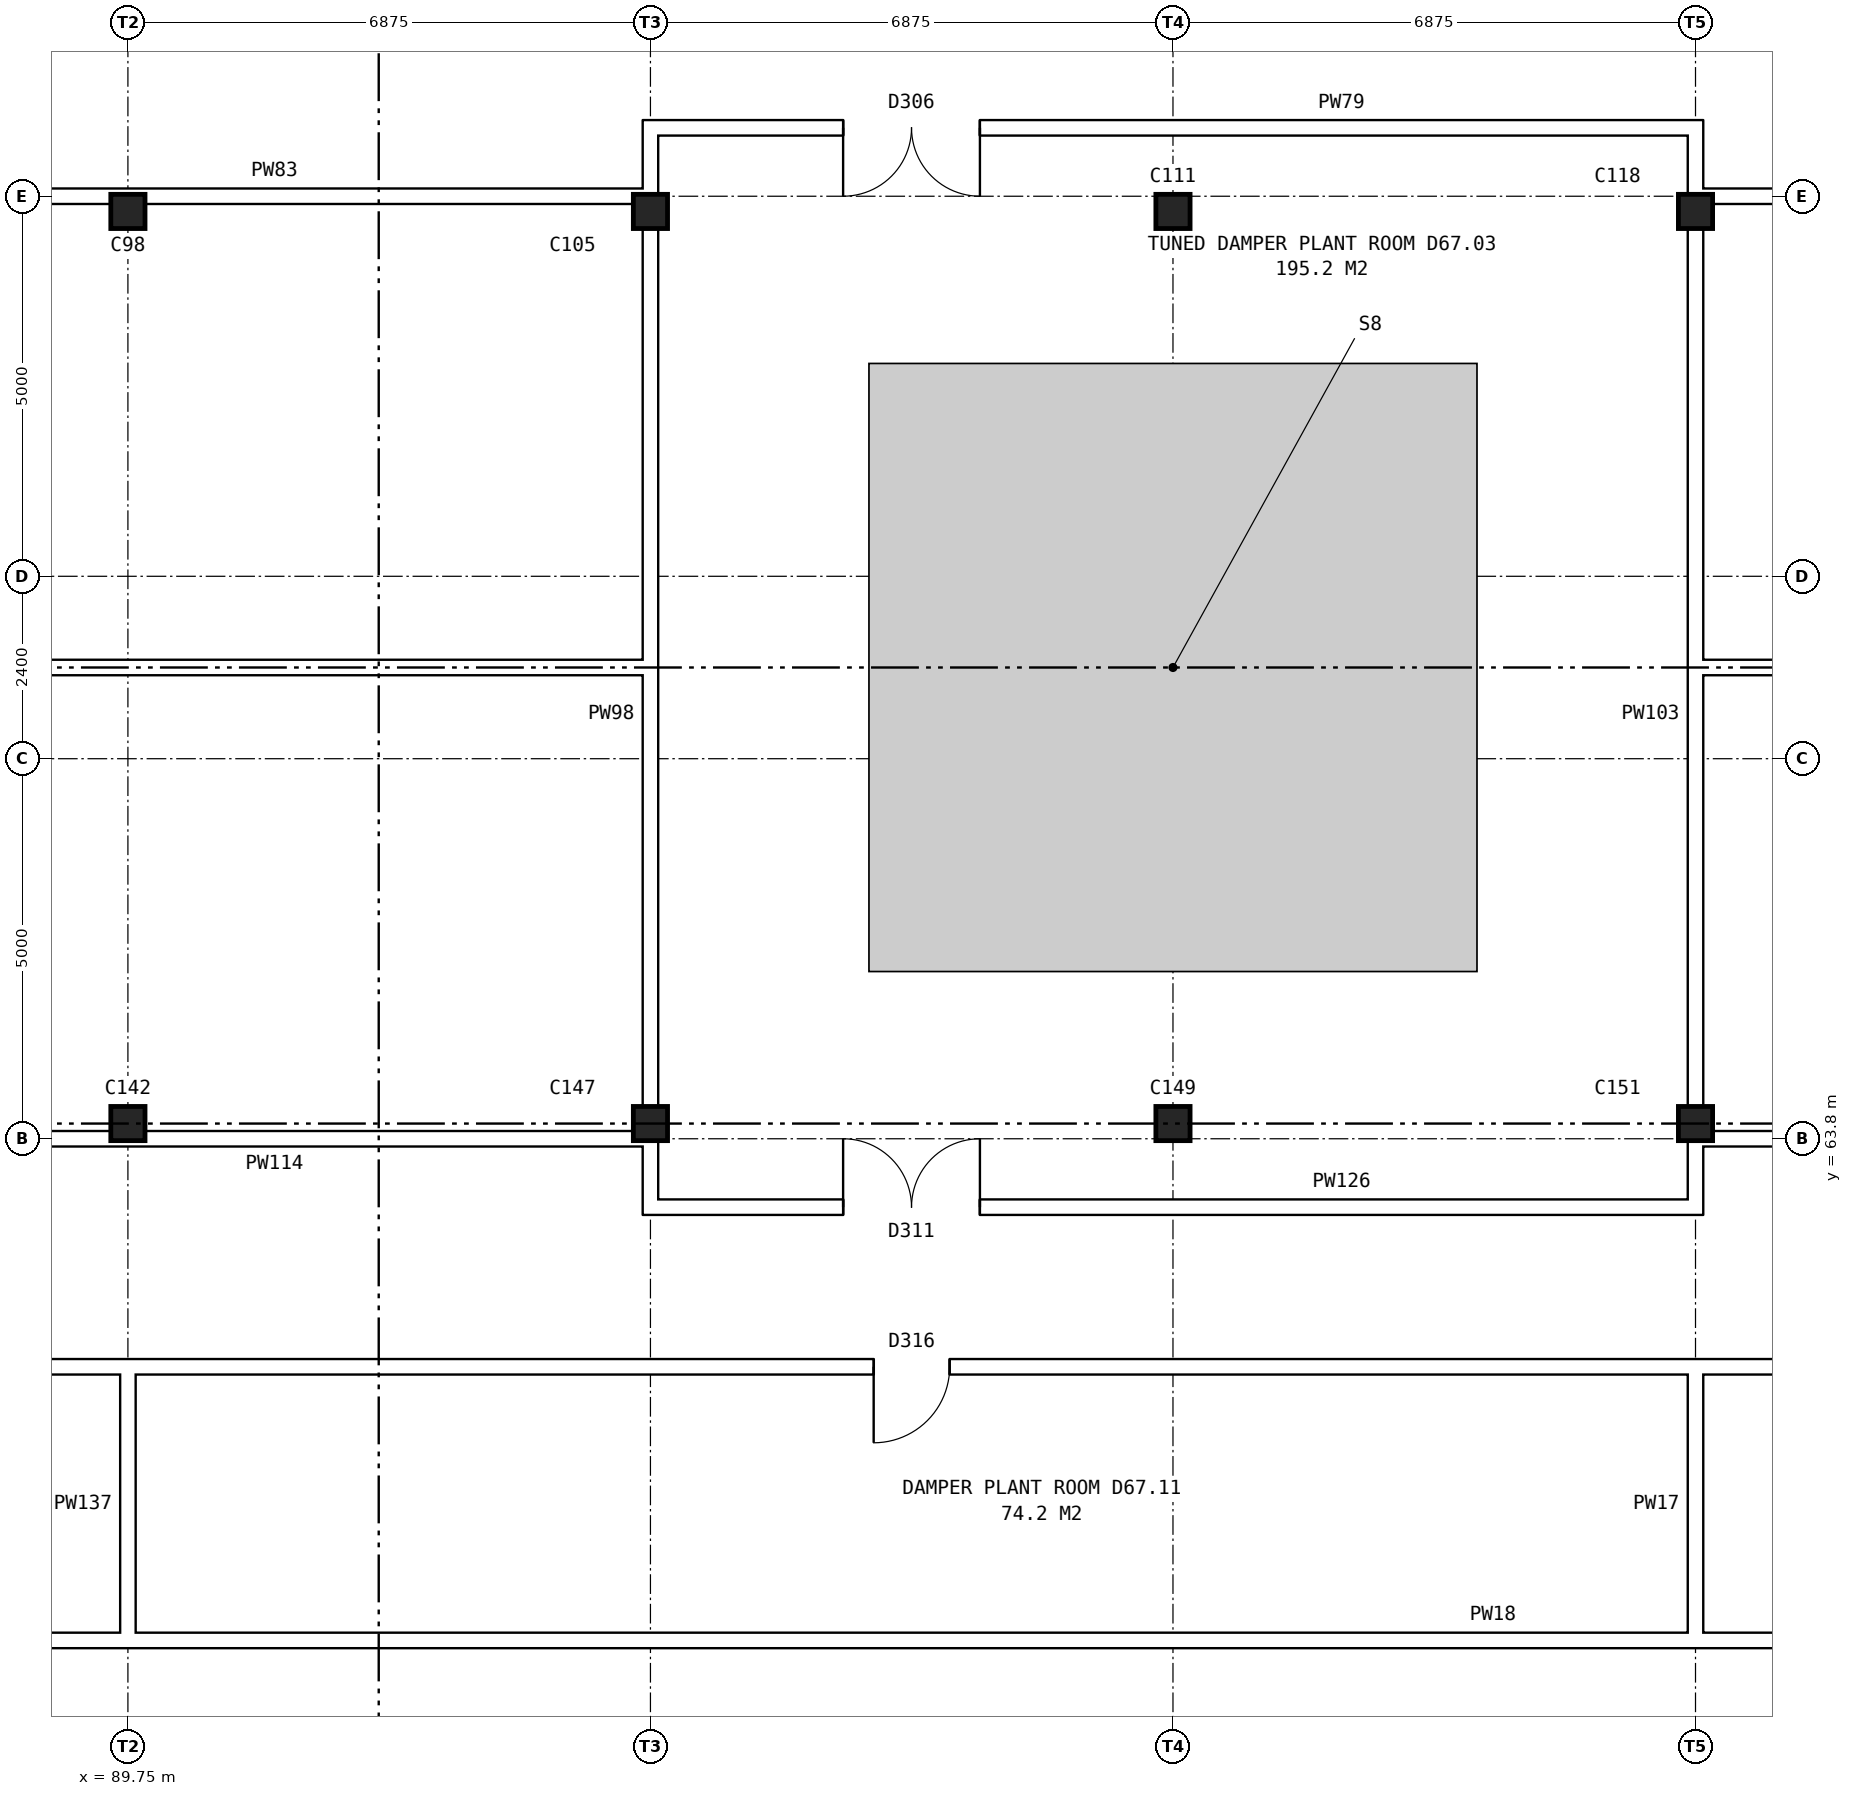
"""IFC4 building model, lengths in metres.
Left out: names, types, materials, properties, quantities, classifications, styles, units other than length and angle.
Written with IfcOpenShell. Run it as: python <this file> out.ifc"""

import sys

from ifc_helpers import new_model, si_unit, direction, frame, frame_2d, origin, origin_2d, place, context, subcontext, project, spatial, rectangle, hollow_rectangle, extrude, element, fill, save


model = new_model("IFC4")
c1 = context("Model", 3, precision=1e-05, world=origin(), true_north=direction((0.0, 1.0)))
c2 = subcontext(c1, "Body", "Model", "MODEL_VIEW")
j1 = project(units=[si_unit("LENGTHUNIT", "METRE"), si_unit("PLANEANGLEUNIT", "RADIAN")], contexts=[c1])
p1 = place(None, origin())
s1 = spatial("IfcSite", under=j1, at=p1, CompositionType="ELEMENT")
p2 = place(p1, origin())
s2 = spatial("IfcBuilding", under=s1, at=p2, CompositionType="ELEMENT")
p3 = place(p2, frame((0.0, 0.0, 236.9)))
s3 = spatial("IfcBuildingStorey", under=s2, at=p3, CompositionType="ELEMENT", Elevation=236.9)
for number, where, z_axis, x_axis in (
    (1, (89.75, 64.0, 0.0), (0.0, 0.0, 1.0), (1.0, 0.0, 0.0)),
    (2, (96.625, 64.0, 0.0), (0.0, 0.0, 1.0), (1.0, 0.0, 0.0)),
    (3, (103.5, 64.0, 0.0), (0.0, 0.0, 1.0), (1.0, 0.0, 0.0)),
    (4, (110.375, 64.0, 0.0), (0.0, 0.0, 1.0), (1.0, 0.0, 0.0)),
    (5, (89.75, 76.0, 0.0), (0.0, 0.0, 1.0), (1.0, 0.0, 0.0)),
    (6, (96.625, 76.0, 0.0), (0.0, 0.0, 1.0), (1.0, 0.0, 0.0)),
    (7, (103.5, 76.0, 0.0), (0.0, 0.0, 1.0), (1.0, 0.0, 0.0)),
    (8, (110.375, 76.0, 0.0), (0.0, 0.0, 1.0), (1.0, 0.0, 0.0)),
):
    element("IfcColumn", number, at=place(p3, frame(where, z_axis=z_axis, x_axis=x_axis)), inside=s3, PredefinedType="COLUMN", context=c2, shape_type="SweptSolid", body=[
        extrude(hollow_rectangle(XDim=0.45, YDim=0.45, WallThickness=0.025, at=origin_2d()), origin(), (0.0, 0.0, 1.0), 6.7),
    ])
p4 = place(p3, frame((46.66, 57.2, 0.0), z_axis=(0.0, 0.0, 1.0), x_axis=(1.0, 0.0, 0.0)))
e9 = element("IfcWall", 9, at=p4, inside=s3, PredefinedType="PARTITIONING", context=c2, shape_type="SweptSolid", body=[
    extrude(rectangle(XDim=122.1, YDim=0.2, at=frame_2d((61.05, 0.0))), origin(), (0.0, 0.0, 1.0), 6.7),
])
p5 = place(p3, frame((46.66, 60.8, 0.0), z_axis=(0.0, 0.0, 1.0), x_axis=(1.0, 0.0, 0.0)))
e10 = element("IfcWall", 10, at=p5, inside=s3, PredefinedType="PARTITIONING", context=c2, shape_type="SweptSolid", body=[
    extrude(rectangle(XDim=122.1, YDim=0.2, at=frame_2d((61.05, 0.0))), origin(), (0.0, 0.0, 1.0), 6.7),
])
p6 = place(p5, frame((6.12, 0.0, 0.0)))
e11 = element("IfcOpeningElement", 11, at=p6, cuts=e10, PredefinedType="OPENING", context=c2, shape_type="SweptSolid", body=[
    extrude(rectangle(XDim=1.0, YDim=2.1, at=frame_2d((0.5, 1.05))), frame((0.0, 0.11, 0.0), z_axis=(0.0, -1.0, 0.0), x_axis=(1.0, 0.0, 0.0)), (0.0, 0.0, 1.0), 0.22),
])
p7 = place(p5, frame((15.64, 0.0, 0.0)))
e12 = element("IfcOpeningElement", 12, at=p7, cuts=e10, PredefinedType="OPENING", context=c2, shape_type="SweptSolid", body=[
    extrude(rectangle(XDim=1.0, YDim=2.1, at=frame_2d((0.5, 1.05))), frame((0.0, 0.11, 0.0), z_axis=(0.0, -1.0, 0.0), x_axis=(1.0, 0.0, 0.0)), (0.0, 0.0, 1.0), 0.22),
])
p8 = place(p5, frame((25.66, 0.0, 0.0)))
e13 = element("IfcOpeningElement", 13, at=p8, cuts=e10, PredefinedType="OPENING", context=c2, shape_type="SweptSolid", body=[
    extrude(rectangle(XDim=1.0, YDim=2.1, at=frame_2d((0.5, 1.05))), frame((0.0, 0.11, 0.0), z_axis=(0.0, -1.0, 0.0), x_axis=(1.0, 0.0, 0.0)), (0.0, 0.0, 1.0), 0.22),
])
p9 = place(p5, frame((35.535, 0.0, 0.0)))
e14 = element("IfcOpeningElement", 14, at=p9, cuts=e10, PredefinedType="OPENING", context=c2, shape_type="SweptSolid", body=[
    extrude(rectangle(XDim=1.0, YDim=2.1, at=frame_2d((0.5, 1.05))), frame((0.0, 0.11, 0.0), z_axis=(0.0, -1.0, 0.0), x_axis=(1.0, 0.0, 0.0)), (0.0, 0.0, 1.0), 0.22),
])
p10 = place(p5, frame((52.902, 0.0, 0.0)))
e15 = element("IfcOpeningElement", 15, at=p10, cuts=e10, PredefinedType="OPENING", context=c2, shape_type="SweptSolid", body=[
    extrude(rectangle(XDim=1.0, YDim=2.1, at=frame_2d((0.5, 1.05))), frame((0.0, 0.11, 0.0), z_axis=(0.0, -1.0, 0.0), x_axis=(1.0, 0.0, 0.0)), (0.0, 0.0, 1.0), 0.22),
])
p11 = place(p5, frame((73.708, 0.0, 0.0)))
e16 = element("IfcOpeningElement", 16, at=p11, cuts=e10, PredefinedType="OPENING", context=c2, shape_type="SweptSolid", body=[
    extrude(rectangle(XDim=1.0, YDim=2.1, at=frame_2d((0.5, 1.05))), frame((0.0, 0.11, 0.0), z_axis=(0.0, -1.0, 0.0), x_axis=(1.0, 0.0, 0.0)), (0.0, 0.0, 1.0), 0.22),
])
p12 = place(p5, frame((90.02, 0.0, 0.0)))
e17 = element("IfcOpeningElement", 17, at=p12, cuts=e10, PredefinedType="OPENING", context=c2, shape_type="SweptSolid", body=[
    extrude(rectangle(XDim=1.0, YDim=2.1, at=frame_2d((0.5, 1.05))), frame((0.0, 0.11, 0.0), z_axis=(0.0, -1.0, 0.0), x_axis=(1.0, 0.0, 0.0)), (0.0, 0.0, 1.0), 0.22),
])
p13 = place(p5, frame((101.84, 0.0, 0.0)))
e18 = element("IfcOpeningElement", 18, at=p13, cuts=e10, PredefinedType="OPENING", context=c2, shape_type="SweptSolid", body=[
    extrude(rectangle(XDim=1.0, YDim=2.1, at=frame_2d((0.5, 1.05))), frame((0.0, 0.11, 0.0), z_axis=(0.0, -1.0, 0.0), x_axis=(1.0, 0.0, 0.0)), (0.0, 0.0, 1.0), 0.22),
])
p14 = place(p5, frame((114.66, 0.0, 0.0)))
e19 = element("IfcOpeningElement", 19, at=p14, cuts=e10, PredefinedType="OPENING", context=c2, shape_type="SweptSolid", body=[
    extrude(rectangle(XDim=1.0, YDim=2.1, at=frame_2d((0.5, 1.05))), frame((0.0, 0.11, 0.0), z_axis=(0.0, -1.0, 0.0), x_axis=(1.0, 0.0, 0.0)), (0.0, 0.0, 1.0), 0.22),
])
p15 = place(p3, frame((96.525, 62.9, 0.0), z_axis=(0.0, 0.0, 1.0), x_axis=(1.0, 0.0, 0.0)))
e20 = element("IfcWall", 20, at=p15, inside=s3, PredefinedType="PARTITIONING", context=c2, shape_type="SweptSolid", body=[
    extrude(rectangle(XDim=13.95, YDim=0.2, at=frame_2d((6.975, 0.0))), origin(), (0.0, 0.0, 1.0), 6.7),
])
p16 = place(p15, frame((2.635, 0.0, 0.0)))
e21 = element("IfcOpeningElement", 21, at=p16, cuts=e20, PredefinedType="OPENING", context=c2, shape_type="SweptSolid", body=[
    extrude(rectangle(XDim=1.8, YDim=2.1, at=frame_2d((0.9, 1.05))), frame((0.0, 0.11, 0.0), z_axis=(0.0, -1.0, 0.0), x_axis=(1.0, 0.0, 0.0)), (0.0, 0.0, 1.0), 0.22),
])
p17 = place(p3, frame((75.64, 63.8, 0.0), z_axis=(0.0, 0.0, 1.0), x_axis=(1.0, 0.0, 0.0)))
e22 = element("IfcWall", 22, at=p17, inside=s3, PredefinedType="PARTITIONING", context=c2, shape_type="SweptSolid", body=[
    extrude(rectangle(XDim=21.085, YDim=0.2, at=frame_2d((10.542, 0.0))), origin(), (0.0, 0.0, 1.0), 6.7),
])
p18 = place(p17, frame((9.992, 0.0, 0.0)))
e23 = element("IfcOpeningElement", 23, at=p18, cuts=e22, PredefinedType="OPENING", context=c2, shape_type="SweptSolid", body=[
    extrude(rectangle(XDim=1.0, YDim=2.1, at=frame_2d((0.5, 1.05))), frame((0.0, 0.11, 0.0), z_axis=(0.0, -1.0, 0.0), x_axis=(1.0, 0.0, 0.0)), (0.0, 0.0, 1.0), 0.22),
])
p19 = place(p3, frame((110.275, 63.8, 0.0), z_axis=(0.0, 0.0, 1.0), x_axis=(1.0, 0.0, 0.0)))
e24 = element("IfcWall", 24, at=p19, inside=s3, PredefinedType="PARTITIONING", context=c2, shape_type="SweptSolid", body=[
    extrude(rectangle(XDim=21.085, YDim=0.2, at=frame_2d((10.542, 0.0))), origin(), (0.0, 0.0, 1.0), 6.7),
])
p20 = place(p19, frame((10.093, 0.0, 0.0)))
e25 = element("IfcOpeningElement", 25, at=p20, cuts=e24, PredefinedType="OPENING", context=c2, shape_type="SweptSolid", body=[
    extrude(rectangle(XDim=1.0, YDim=2.1, at=frame_2d((0.5, 1.05))), frame((0.0, 0.11, 0.0), z_axis=(0.0, -1.0, 0.0), x_axis=(1.0, 0.0, 0.0)), (0.0, 0.0, 1.0), 0.22),
])
for number, where, z_axis, x_axis in (
    (26, (75.64, 70.0, 0.0), (0.0, 0.0, 1.0), (1.0, 0.0, 0.0)),
    (27, (110.275, 70.0, 0.0), (0.0, 0.0, 1.0), (1.0, 0.0, 0.0)),
):
    element("IfcWall", number, at=place(p3, frame(where, z_axis=z_axis, x_axis=x_axis)), inside=s3, PredefinedType="PARTITIONING", context=c2, shape_type="SweptSolid", body=[
        extrude(rectangle(XDim=21.085, YDim=0.2, at=frame_2d((10.542, 0.0))), origin(), (0.0, 0.0, 1.0), 6.7),
    ])
p21 = place(p3, frame((75.64, 76.2, 0.0), z_axis=(0.0, 0.0, 1.0), x_axis=(1.0, 0.0, 0.0)))
e28 = element("IfcWall", 28, at=p21, inside=s3, PredefinedType="PARTITIONING", context=c2, shape_type="SweptSolid", body=[
    extrude(rectangle(XDim=21.085, YDim=0.2, at=frame_2d((10.542, 0.0))), origin(), (0.0, 0.0, 1.0), 6.7),
])
p22 = place(p21, frame((9.992, 0.0, 0.0)))
e29 = element("IfcOpeningElement", 29, at=p22, cuts=e28, PredefinedType="OPENING", context=c2, shape_type="SweptSolid", body=[
    extrude(rectangle(XDim=1.0, YDim=2.1, at=frame_2d((0.5, 1.05))), frame((0.0, 0.11, 0.0), z_axis=(0.0, -1.0, 0.0), x_axis=(1.0, 0.0, 0.0)), (0.0, 0.0, 1.0), 0.22),
])
p23 = place(p3, frame((110.275, 76.2, 0.0), z_axis=(0.0, 0.0, 1.0), x_axis=(1.0, 0.0, 0.0)))
e30 = element("IfcWall", 30, at=p23, inside=s3, PredefinedType="PARTITIONING", context=c2, shape_type="SweptSolid", body=[
    extrude(rectangle(XDim=21.085, YDim=0.2, at=frame_2d((10.542, 0.0))), origin(), (0.0, 0.0, 1.0), 6.7),
])
p24 = place(p23, frame((10.093, 0.0, 0.0)))
e31 = element("IfcOpeningElement", 31, at=p24, cuts=e30, PredefinedType="OPENING", context=c2, shape_type="SweptSolid", body=[
    extrude(rectangle(XDim=1.0, YDim=2.1, at=frame_2d((0.5, 1.05))), frame((0.0, 0.11, 0.0), z_axis=(0.0, -1.0, 0.0), x_axis=(1.0, 0.0, 0.0)), (0.0, 0.0, 1.0), 0.22),
])
p25 = place(p3, frame((96.525, 77.1, 0.0), z_axis=(0.0, 0.0, 1.0), x_axis=(1.0, 0.0, 0.0)))
e32 = element("IfcWall", 32, at=p25, inside=s3, PredefinedType="PARTITIONING", context=c2, shape_type="SweptSolid", body=[
    extrude(rectangle(XDim=13.95, YDim=0.2, at=frame_2d((6.975, 0.0))), origin(), (0.0, 0.0, 1.0), 6.7),
])
p26 = place(p25, frame((2.635, 0.0, 0.0)))
e33 = element("IfcOpeningElement", 33, at=p26, cuts=e32, PredefinedType="OPENING", context=c2, shape_type="SweptSolid", body=[
    extrude(rectangle(XDim=1.8, YDim=2.1, at=frame_2d((0.9, 1.05))), frame((0.0, 0.11, 0.0), z_axis=(0.0, -1.0, 0.0), x_axis=(1.0, 0.0, 0.0)), (0.0, 0.0, 1.0), 0.22),
])
p27 = place(p3, frame((89.75, 57.1, 0.0), z_axis=(0.0, 0.0, 1.0), x_axis=(0.0, 1.0, 0.0)))
e34 = element("IfcWall", 34, at=p27, inside=s3, PredefinedType="PARTITIONING", context=c2, shape_type="SweptSolid", body=[
    extrude(rectangle(XDim=3.8, YDim=0.2, at=frame_2d((1.9, 0.0))), origin(), (0.0, 0.0, 1.0), 6.167),
])
p28 = place(p3, frame((96.625, 62.8, 0.0), z_axis=(0.0, 0.0, 1.0), x_axis=(0.0, 1.0, 0.0)))
e35 = element("IfcWall", 35, at=p28, inside=s3, PredefinedType="PARTITIONING", context=c2, shape_type="SweptSolid", body=[
    extrude(rectangle(XDim=14.4, YDim=0.2, at=frame_2d((7.2, 0.0))), origin(), (0.0, 0.0, 1.0), 6.088),
])
p29 = place(p3, frame((110.375, 57.1, 0.0), z_axis=(0.0, 0.0, 1.0), x_axis=(0.0, 1.0, 0.0)))
e36 = element("IfcWall", 36, at=p29, inside=s3, PredefinedType="PARTITIONING", context=c2, shape_type="SweptSolid", body=[
    extrude(rectangle(XDim=3.8, YDim=0.2, at=frame_2d((1.9, 0.0))), origin(), (0.0, 0.0, 1.0), 6.167),
])
p30 = place(p3, frame((110.375, 62.8, 0.0), z_axis=(0.0, 0.0, 1.0), x_axis=(0.0, 1.0, 0.0)))
e37 = element("IfcWall", 37, at=p30, inside=s3, PredefinedType="PARTITIONING", context=c2, shape_type="SweptSolid", body=[
    extrude(rectangle(XDim=14.4, YDim=0.2, at=frame_2d((7.2, 0.0))), origin(), (0.0, 0.0, 1.0), 6.088),
])
p31 = place(p10, frame((1.0, 0.0, 0.0), z_axis=(0.0, 0.0, 1.0), x_axis=(-1.0, 0.0, 0.0)))
e38 = element("IfcDoor", 38, at=p31, inside=s3, OperationType="SINGLE_SWING_RIGHT", PredefinedType="DOOR", context=c2, shape_type="SweptSolid", body=[
    extrude(rectangle(XDim=1.0, YDim=2.1, at=frame_2d((0.5, 1.05))), frame((0.0, 0.025, 0.0), z_axis=(0.0, -1.0, 0.0), x_axis=(1.0, 0.0, 0.0)), (0.0, 0.0, 1.0), 0.05),
])
fill(e15, e38)
p32 = place(p16, origin())
e39 = element("IfcDoor", 39, at=p32, inside=s3, OperationType="DOUBLE_DOOR_SINGLE_SWING", PredefinedType="DOOR", context=c2, shape_type="SweptSolid", body=[
    extrude(rectangle(XDim=1.8, YDim=2.1, at=frame_2d((0.9, 1.05))), frame((0.0, 0.025, 0.0), z_axis=(0.0, -1.0, 0.0), x_axis=(1.0, 0.0, 0.0)), (0.0, 0.0, 1.0), 0.05),
])
fill(e21, e39)
p33 = place(p26, frame((1.8, 0.0, 0.0), z_axis=(0.0, 0.0, 1.0), x_axis=(-1.0, 0.0, 0.0)))
e40 = element("IfcDoor", 40, at=p33, inside=s3, OperationType="DOUBLE_DOOR_SINGLE_SWING", PredefinedType="DOOR", context=c2, shape_type="SweptSolid", body=[
    extrude(rectangle(XDim=1.8, YDim=2.1, at=frame_2d((0.9, 1.05))), frame((0.0, 0.025, 0.0), z_axis=(0.0, -1.0, 0.0), x_axis=(1.0, 0.0, 0.0)), (0.0, 0.0, 1.0), 0.05),
])
fill(e33, e40)
save(model, sys.argv[1])
